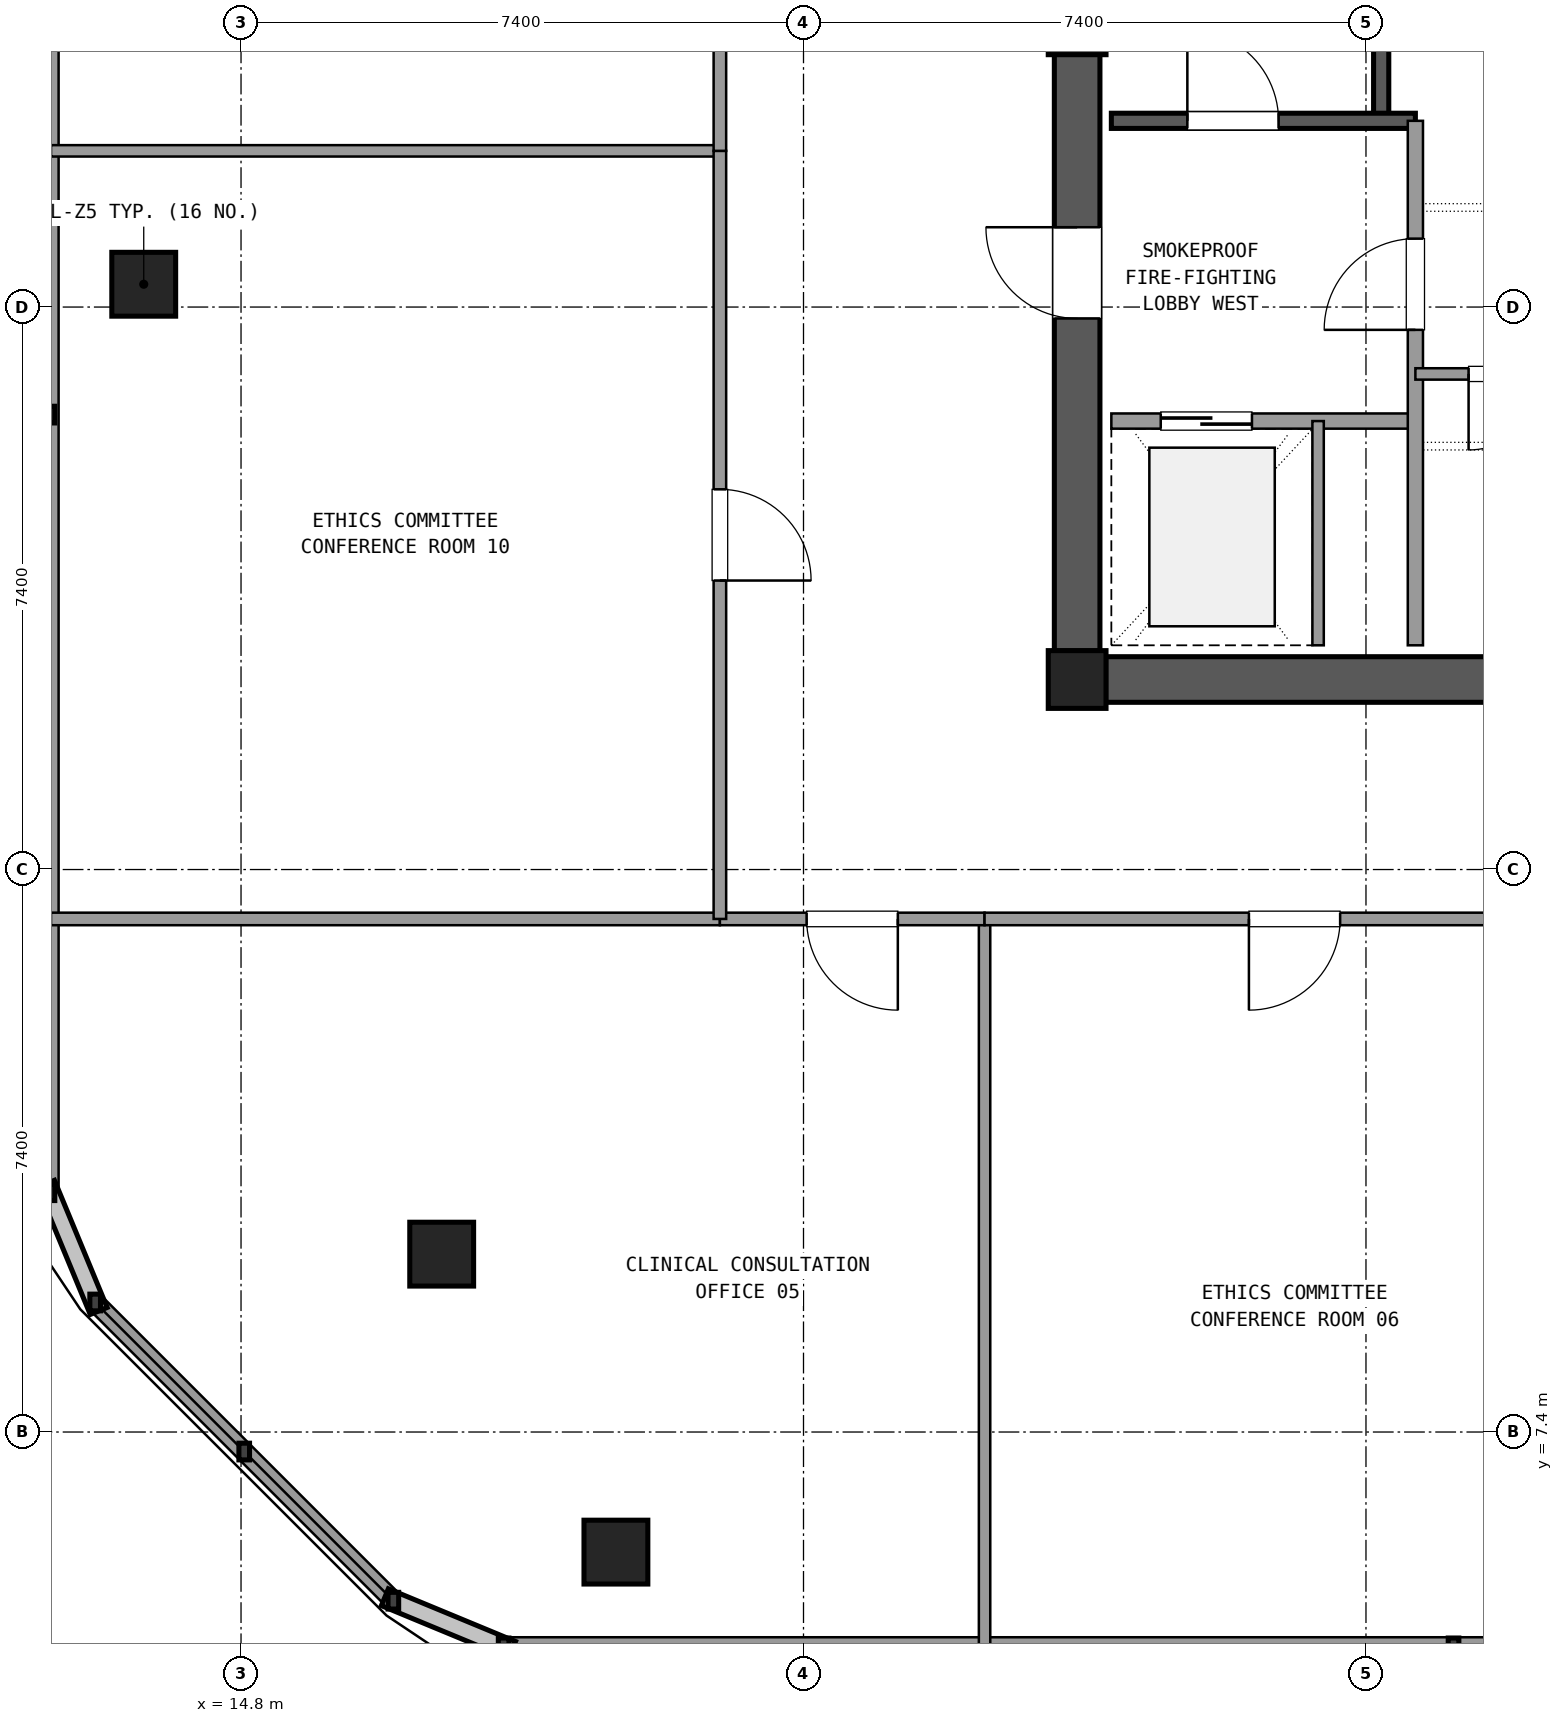
"""IFC4 building model, lengths in metres.
Left out: names, types, materials, properties, quantities, classifications, styles, units other than length and angle.
Written with IfcOpenShell. Run it as: python <this file> out.ifc"""

import sys

from ifc_helpers import new_model, si_unit, direction, frame, frame_2d, origin, origin_2d, place, context, subcontext, project, spatial, rectangle, extrude, element, fill, save


model = new_model("IFC4")
c1 = context("Model", 3, precision=1e-05, world=origin(), true_north=direction((0.0, 1.0)))
c2 = subcontext(c1, "Body", "Model", "MODEL_VIEW")
j1 = project(units=[si_unit("LENGTHUNIT", "METRE"), si_unit("PLANEANGLEUNIT", "RADIAN")], contexts=[c1])
p1 = place(None, origin())
s1 = spatial("IfcSite", under=j1, at=p1, CompositionType="ELEMENT")
p2 = place(p1, origin())
s2 = spatial("IfcBuilding", under=s1, at=p2, CompositionType="ELEMENT")
p3 = place(p2, frame((0.0, 0.0, 275.22)))
s3 = spatial("IfcBuildingStorey", under=s2, at=p3, CompositionType="ELEMENT", Elevation=275.22)
for number, where, z_axis, x_axis in (
    (1, (25.8, 17.3, 0.0), (0.0, 0.0, 1.0), (1.0, 0.0, 0.0)),
    (2, (25.8, 25.9, 0.0), (0.0, 0.0, 1.0), (1.0, 0.0, 0.0)),
):
    element("IfcColumn", number, at=place(p3, frame(where, z_axis=z_axis, x_axis=x_axis)), inside=s3, PredefinedType="COLUMN", context=c2, shape_type="SweptSolid", body=[
        extrude(rectangle(XDim=0.76, YDim=0.76, at=origin_2d()), origin(), (0.0, 0.0, 1.0), 3.6),
    ])
p4 = place(p3, frame((26.175, 17.3, 0.0), z_axis=(0.0, 0.0, 1.0), x_axis=(1.0, 0.0, 0.0)))
e3 = element("IfcWall", 3, at=p4, inside=s3, PredefinedType="SHEAR", context=c2, shape_type="SweptSolid", body=[
    extrude(rectangle(XDim=10.45, YDim=0.6, at=frame_2d((5.225, 0.0))), origin(), (0.0, 0.0, 1.0), 3.32),
])
p5 = place(p3, frame((25.8, 25.525, 0.0), z_axis=(0.0, 0.0, 1.0), x_axis=(0.0, -1.0, 0.0)))
e4 = element("IfcWall", 4, at=p5, inside=s3, PredefinedType="SHEAR", context=c2, shape_type="SweptSolid", body=[
    extrude(rectangle(XDim=7.85, YDim=0.6, at=frame_2d((3.925, 0.0))), origin(), (0.0, 0.0, 1.0), 3.32),
])
p6 = place(p5, frame((2.275, 0.0, 0.0)))
e5 = element("IfcOpeningElement", 5, at=p6, cuts=e4, PredefinedType="OPENING", context=c2, shape_type="SweptSolid", body=[
    extrude(rectangle(XDim=1.2, YDim=2.15, at=frame_2d((0.6, 1.075))), frame((0.0, 0.31, 0.0), z_axis=(0.0, -1.0, 0.0), x_axis=(1.0, 0.0, 0.0)), (0.0, 0.0, 1.0), 0.62),
])
for number, where, z_axis, x_axis in (
    (6, (13.52, 22.5, 0.0), (0.0, 0.0, 1.0), (1.0, 0.0, 0.0)),
    (7, (17.44, 9.74, 0.0), (0.0, 0.0, 1.0), (1.0, 0.0, 0.0)),
    (8, (19.732, 5.82, 0.0), (0.0, 0.0, 1.0), (1.0, 0.0, 0.0)),
):
    element("IfcColumn", number, at=place(p3, frame(where, z_axis=z_axis, x_axis=x_axis)), inside=s3, PredefinedType="COLUMN", context=c2, shape_type="SweptSolid", body=[
        extrude(rectangle(XDim=0.84, YDim=0.84, at=origin_2d()), origin(), (0.0, 0.0, 1.0), 3.6),
    ])
p7 = place(p3, frame((18.255, 4.58, 0.0), z_axis=(0.0, 0.0, 1.0), x_axis=(1.0, 0.0, 0.0)))
e9 = element("IfcWall", 9, at=p7, inside=s3, PredefinedType="SOLIDWALL", context=c2, shape_type="SweptSolid", body=[
    extrude(rectangle(XDim=37.49, YDim=0.24, at=frame_2d((18.745, 0.0))), origin(), (0.0, 0.0, 1.0), 0.85),
])
p8 = place(p3, frame((12.28, 41.245, 0.0), z_axis=(0.0, 0.0, 1.0), x_axis=(0.0, -1.0, 0.0)))
e10 = element("IfcWall", 10, at=p8, inside=s3, PredefinedType="SOLIDWALL", context=c2, shape_type="SweptSolid", body=[
    extrude(rectangle(XDim=30.69, YDim=0.24, at=frame_2d((15.345, 0.0))), origin(), (0.0, 0.0, 1.0), 0.85),
])
p9 = place(p3, frame((12.881, 9.104, 0.0), z_axis=(0.0, 0.0, 1.0), x_axis=(0.707084777957, -0.707128783731, 0.0)))
e11 = element("IfcWall", 11, at=p9, inside=s3, PredefinedType="SOLIDWALL", context=c2, shape_type="SweptSolid", body=[
    extrude(rectangle(XDim=5.548, YDim=0.24, at=frame_2d((2.774, 0.0))), origin(), (0.0, 0.0, 1.0), 0.85),
])
p10 = place(p3, frame((29.8, 24.65, 0.0), z_axis=(0.0, 0.0, 1.0), x_axis=(0.0, 1.0, 0.0)))
e12 = element("IfcWall", 12, at=p10, inside=s3, PredefinedType="SHEAR", context=c2, shape_type="SweptSolid", body=[
    extrude(rectangle(XDim=9.4, YDim=0.2, at=frame_2d((4.7, 0.0))), origin(), (0.0, 0.0, 1.0), 3.32),
])
p11 = place(p3, frame((26.25, 24.65, 0.0), z_axis=(0.0, 0.0, 1.0), x_axis=(1.0, 0.0, 0.0)))
e13 = element("IfcWall", 13, at=p11, inside=s3, PredefinedType="SHEAR", context=c2, shape_type="SweptSolid", body=[
    extrude(rectangle(XDim=4.0, YDim=0.2, at=frame_2d((2.0, 0.0))), origin(), (0.0, 0.0, 1.0), 3.32),
])
p12 = place(p11, frame((1.0, 0.0, 0.0)))
e14 = element("IfcOpeningElement", 14, at=p12, cuts=e13, PredefinedType="OPENING", context=c2, shape_type="SweptSolid", body=[
    extrude(rectangle(XDim=1.2, YDim=2.15, at=frame_2d((0.6, 1.075))), frame((0.0, 0.11, 0.0), z_axis=(0.0, -1.0, 0.0), x_axis=(1.0, 0.0, 0.0)), (0.0, 0.0, 1.0), 0.22),
])
p13 = place(p3, frame((26.25, 20.7, 0.0), z_axis=(0.0, 0.0, 1.0), x_axis=(1.0, 0.0, 0.0)))
e15 = element("IfcWall", 15, at=p13, inside=s3, PredefinedType="SOLIDWALL", context=c2, shape_type="SweptSolid", body=[
    extrude(rectangle(XDim=4.0, YDim=0.2, at=frame_2d((2.0, 0.0))), origin(), (0.0, 0.0, 1.0), 2.61),
])
p14 = place(p13, frame((0.65, 0.0, 0.0)))
e16 = element("IfcOpeningElement", 16, at=p14, cuts=e15, PredefinedType="OPENING", context=c2, shape_type="SweptSolid", body=[
    extrude(rectangle(XDim=1.2, YDim=2.15, at=frame_2d((0.6, 1.075))), frame((0.0, 0.11, 0.0), z_axis=(0.0, -1.0, 0.0), x_axis=(1.0, 0.0, 0.0)), (0.0, 0.0, 1.0), 0.22),
])
p15 = place(p3, frame((30.25, 17.75, 0.0), z_axis=(0.0, 0.0, 1.0), x_axis=(0.0, 1.0, 0.0)))
e17 = element("IfcWall", 17, at=p15, inside=s3, PredefinedType="SOLIDWALL", context=c2, shape_type="SweptSolid", body=[
    extrude(rectangle(XDim=6.9, YDim=0.2, at=frame_2d((3.45, 0.0))), origin(), (0.0, 0.0, 1.0), 2.61),
])
p16 = place(p15, frame((4.15, 0.0, 0.0)))
e18 = element("IfcOpeningElement", 18, at=p16, cuts=e17, PredefinedType="OPENING", context=c2, shape_type="SweptSolid", body=[
    extrude(rectangle(XDim=1.2, YDim=2.15, at=frame_2d((0.6, 1.075))), frame((0.0, 0.11, 0.0), z_axis=(0.0, -1.0, 0.0), x_axis=(1.0, 0.0, 0.0)), (0.0, 0.0, 1.0), 0.22),
])
p17 = place(p3, frame((28.97, 17.75, 0.0), z_axis=(0.0, 0.0, 1.0), x_axis=(0.0, 1.0, 0.0)))
e19 = element("IfcWall", 19, at=p17, inside=s3, PredefinedType="PARTITIONING", context=c2, shape_type="SweptSolid", body=[
    extrude(rectangle(XDim=2.95, YDim=0.15, at=frame_2d((1.475, 0.0))), origin(), (0.0, 0.0, 1.0), 2.61),
])
p18 = place(p3, frame((30.25, 21.32, 0.0), z_axis=(0.0, 0.0, 1.0), x_axis=(1.0, 0.0, 0.0)))
e20 = element("IfcWall", 20, at=p18, inside=s3, PredefinedType="PARTITIONING", context=c2, shape_type="SweptSolid", body=[
    extrude(rectangle(XDim=7.0, YDim=0.15, at=frame_2d((3.5, 0.0))), origin(), (0.0, 0.0, 1.0), 2.61),
])
p19 = place(p18, frame((0.7, 0.0, 0.0)))
e21 = element("IfcOpeningElement", 21, at=p19, cuts=e20, PredefinedType="OPENING", context=c2, shape_type="SweptSolid", body=[
    extrude(rectangle(XDim=1.0, YDim=2.15, at=frame_2d((0.5, 1.075))), frame((0.0, 0.085, 0.0), z_axis=(0.0, -1.0, 0.0), x_axis=(1.0, 0.0, 0.0)), (0.0, 0.0, 1.0), 0.17),
])
p20 = place(p18, frame((4.85, 0.0, 0.0)))
e22 = element("IfcOpeningElement", 22, at=p20, cuts=e20, PredefinedType="OPENING", context=c2, shape_type="SweptSolid", body=[
    extrude(rectangle(XDim=1.0, YDim=2.15, at=frame_2d((0.5, 1.075))), frame((0.0, 0.085, 0.0), z_axis=(0.0, -1.0, 0.0), x_axis=(1.0, 0.0, 0.0)), (0.0, 0.0, 1.0), 0.17),
])
p21 = place(p3, frame((12.3, 14.15, 0.0), z_axis=(0.0, 0.0, 1.0), x_axis=(1.0, 0.0, 0.0)))
e23 = element("IfcWall", 23, at=p21, inside=s3, PredefinedType="PARTITIONING", context=c2, shape_type="SweptSolid", body=[
    extrude(rectangle(XDim=8.8, YDim=0.165, at=frame_2d((4.4, 0.0))), origin(), (0.0, 0.0, 1.0), 2.61),
])
p22 = place(p3, frame((24.582, 14.15, 0.0), z_axis=(0.0, 0.0, 1.0), x_axis=(0.0, -1.0, 0.0)))
e24 = element("IfcWall", 24, at=p22, inside=s3, PredefinedType="PARTITIONING", context=c2, shape_type="SweptSolid", body=[
    extrude(rectangle(XDim=9.55, YDim=0.15, at=frame_2d((4.775, 0.0))), origin(), (0.0, 0.0, 1.0), 2.61),
])
p23 = place(p3, frame((21.1, 14.15, 0.0), z_axis=(0.0, 0.0, 1.0), x_axis=(1.0, 0.0, 0.0)))
e25 = element("IfcWall", 25, at=p23, inside=s3, PredefinedType="PARTITIONING", context=c2, shape_type="SweptSolid", body=[
    extrude(rectangle(XDim=3.482, YDim=0.165, at=frame_2d((1.741, 0.0))), origin(), (0.0, 0.0, 1.0), 2.61),
])
p24 = place(p23, frame((1.141, 0.0, 0.0)))
e26 = element("IfcOpeningElement", 26, at=p24, cuts=e25, PredefinedType="OPENING", context=c2, shape_type="SweptSolid", body=[
    extrude(rectangle(XDim=1.2, YDim=2.15, at=frame_2d((0.6, 1.075))), frame((0.0, 0.093, 0.0), z_axis=(0.0, -1.0, 0.0), x_axis=(1.0, 0.0, 0.0)), (0.0, 0.0, 1.0), 0.185),
])
p25 = place(p3, frame((24.582, 14.15, 0.0), z_axis=(0.0, 0.0, 1.0), x_axis=(1.0, 0.0, 0.0)))
e27 = element("IfcWall", 27, at=p25, inside=s3, PredefinedType="PARTITIONING", context=c2, shape_type="SweptSolid", body=[
    extrude(rectangle(XDim=8.156, YDim=0.165, at=frame_2d((4.078, 0.0))), origin(), (0.0, 0.0, 1.0), 2.61),
])
p26 = place(p25, frame((3.478, 0.0, 0.0)))
e28 = element("IfcOpeningElement", 28, at=p26, cuts=e27, PredefinedType="OPENING", context=c2, shape_type="SweptSolid", body=[
    extrude(rectangle(XDim=1.2, YDim=2.15, at=frame_2d((0.6, 1.075))), frame((0.0, 0.093, 0.0), z_axis=(0.0, -1.0, 0.0), x_axis=(1.0, 0.0, 0.0)), (0.0, 0.0, 1.0), 0.185),
])
p27 = place(p3, frame((21.1, 24.255, 0.0), z_axis=(0.0, 0.0, 1.0), x_axis=(-1.0, 0.0, 0.0)))
e29 = element("IfcWall", 29, at=p27, inside=s3, PredefinedType="PARTITIONING", context=c2, shape_type="SweptSolid", body=[
    extrude(rectangle(XDim=8.8, YDim=0.15, at=frame_2d((4.4, 0.0))), origin(), (0.0, 0.0, 1.0), 2.61),
])
p28 = place(p3, frame((21.1, 14.15, 0.0), z_axis=(0.0, 0.0, 1.0), x_axis=(0.0, 1.0, 0.0)))
e30 = element("IfcWall", 30, at=p28, inside=s3, PredefinedType="PARTITIONING", context=c2, shape_type="SweptSolid", body=[
    extrude(rectangle(XDim=10.105, YDim=0.165, at=frame_2d((5.052, 0.0))), origin(), (0.0, 0.0, 1.0), 2.61),
])
p29 = place(p28, frame((4.452, 0.0, 0.0)))
e31 = element("IfcOpeningElement", 31, at=p29, cuts=e30, PredefinedType="OPENING", context=c2, shape_type="SweptSolid", body=[
    extrude(rectangle(XDim=1.2, YDim=2.15, at=frame_2d((0.6, 1.075))), frame((0.0, 0.093, 0.0), z_axis=(0.0, -1.0, 0.0), x_axis=(1.0, 0.0, 0.0)), (0.0, 0.0, 1.0), 0.185),
])
p30 = place(p3, frame((21.1, 24.255, 0.0), z_axis=(0.0, 0.0, 1.0), x_axis=(0.0, 1.0, 0.0)))
e32 = element("IfcWall", 32, at=p30, inside=s3, PredefinedType="PARTITIONING", context=c2, shape_type="SweptSolid", body=[
    extrude(rectangle(XDim=13.395, YDim=0.165, at=frame_2d((6.698, 0.0))), origin(), (0.0, 0.0, 1.0), 2.61),
])
p31 = place(p30, frame((6.098, 0.0, 0.0)))
e33 = element("IfcOpeningElement", 33, at=p31, cuts=e32, PredefinedType="OPENING", context=c2, shape_type="SweptSolid", body=[
    extrude(rectangle(XDim=1.2, YDim=2.15, at=frame_2d((0.6, 1.075))), frame((0.0, 0.093, 0.0), z_axis=(0.0, -1.0, 0.0), x_axis=(1.0, 0.0, 0.0)), (0.0, 0.0, 1.0), 0.185),
])
p32 = place(p12, origin())
e34 = element("IfcDoor", 34, at=p32, inside=s3, OperationType="SINGLE_SWING_LEFT", PredefinedType="DOOR", context=c2, shape_type="SweptSolid", body=[
    extrude(rectangle(XDim=1.2, YDim=2.15, at=frame_2d((0.6, 1.075))), frame((0.0, 0.025, 0.0), z_axis=(0.0, -1.0, 0.0), x_axis=(1.0, 0.0, 0.0)), (0.0, 0.0, 1.0), 0.05),
])
fill(e14, e34)
p33 = place(p14, origin())
e35 = element("IfcDoor", 35, at=p33, inside=s3, OperationType="SLIDING_TO_LEFT", PredefinedType="DOOR", context=c2, shape_type="SweptSolid", body=[
    extrude(rectangle(XDim=1.2, YDim=2.15, at=frame_2d((0.6, 1.075))), frame((0.0, 0.025, 0.0), z_axis=(0.0, -1.0, 0.0), x_axis=(1.0, 0.0, 0.0)), (0.0, 0.0, 1.0), 0.05),
])
fill(e16, e35)
p34 = place(p16, origin())
e36 = element("IfcDoor", 36, at=p34, inside=s3, OperationType="SINGLE_SWING_LEFT", PredefinedType="DOOR", context=c2, shape_type="SweptSolid", body=[
    extrude(rectangle(XDim=1.2, YDim=2.15, at=frame_2d((0.6, 1.075))), frame((0.0, 0.025, 0.0), z_axis=(0.0, -1.0, 0.0), x_axis=(1.0, 0.0, 0.0)), (0.0, 0.0, 1.0), 0.05),
])
fill(e18, e36)
p35 = place(p6, frame((1.2, 0.0, 0.0), z_axis=(0.0, 0.0, 1.0), x_axis=(-1.0, 0.0, 0.0)))
e37 = element("IfcDoor", 37, at=p35, inside=s3, OperationType="SINGLE_SWING_LEFT", PredefinedType="DOOR", context=c2, shape_type="SweptSolid", body=[
    extrude(rectangle(XDim=1.2, YDim=2.15, at=frame_2d((0.6, 1.075))), frame((0.0, 0.025, 0.0), z_axis=(0.0, -1.0, 0.0), x_axis=(1.0, 0.0, 0.0)), (0.0, 0.0, 1.0), 0.05),
])
fill(e5, e37)
p36 = place(p19, frame((1.0, 0.0, 0.0), z_axis=(0.0, 0.0, 1.0), x_axis=(-1.0, 0.0, 0.0)))
e38 = element("IfcDoor", 38, at=p36, inside=s3, OperationType="SINGLE_SWING_LEFT", PredefinedType="DOOR", context=c2, shape_type="SweptSolid", body=[
    extrude(rectangle(XDim=1.0, YDim=2.15, at=frame_2d((0.5, 1.075))), frame((0.0, 0.025, 0.0), z_axis=(0.0, -1.0, 0.0), x_axis=(1.0, 0.0, 0.0)), (0.0, 0.0, 1.0), 0.05),
])
fill(e21, e38)
p37 = place(p24, frame((1.2, 0.0, 0.0), z_axis=(0.0, 0.0, 1.0), x_axis=(-1.0, 0.0, 0.0)))
e39 = element("IfcDoor", 39, at=p37, inside=s3, OperationType="SINGLE_SWING_RIGHT", PredefinedType="DOOR", context=c2, shape_type="SweptSolid", body=[
    extrude(rectangle(XDim=1.2, YDim=2.15, at=frame_2d((0.6, 1.075))), frame((0.0, 0.025, 0.0), z_axis=(0.0, -1.0, 0.0), x_axis=(1.0, 0.0, 0.0)), (0.0, 0.0, 1.0), 0.05),
])
fill(e26, e39)
p38 = place(p26, frame((1.2, 0.0, 0.0), z_axis=(0.0, 0.0, 1.0), x_axis=(-1.0, 0.0, 0.0)))
e40 = element("IfcDoor", 40, at=p38, inside=s3, OperationType="SINGLE_SWING_LEFT", PredefinedType="DOOR", context=c2, shape_type="SweptSolid", body=[
    extrude(rectangle(XDim=1.2, YDim=2.15, at=frame_2d((0.6, 1.075))), frame((0.0, 0.025, 0.0), z_axis=(0.0, -1.0, 0.0), x_axis=(1.0, 0.0, 0.0)), (0.0, 0.0, 1.0), 0.05),
])
fill(e28, e40)
p39 = place(p29, frame((1.2, 0.0, 0.0), z_axis=(0.0, 0.0, 1.0), x_axis=(-1.0, 0.0, 0.0)))
e41 = element("IfcDoor", 41, at=p39, inside=s3, OperationType="SINGLE_SWING_LEFT", PredefinedType="DOOR", context=c2, shape_type="SweptSolid", body=[
    extrude(rectangle(XDim=1.2, YDim=2.15, at=frame_2d((0.6, 1.075))), frame((0.0, 0.025, 0.0), z_axis=(0.0, -1.0, 0.0), x_axis=(1.0, 0.0, 0.0)), (0.0, 0.0, 1.0), 0.05),
])
fill(e31, e41)
save(model, sys.argv[1])
